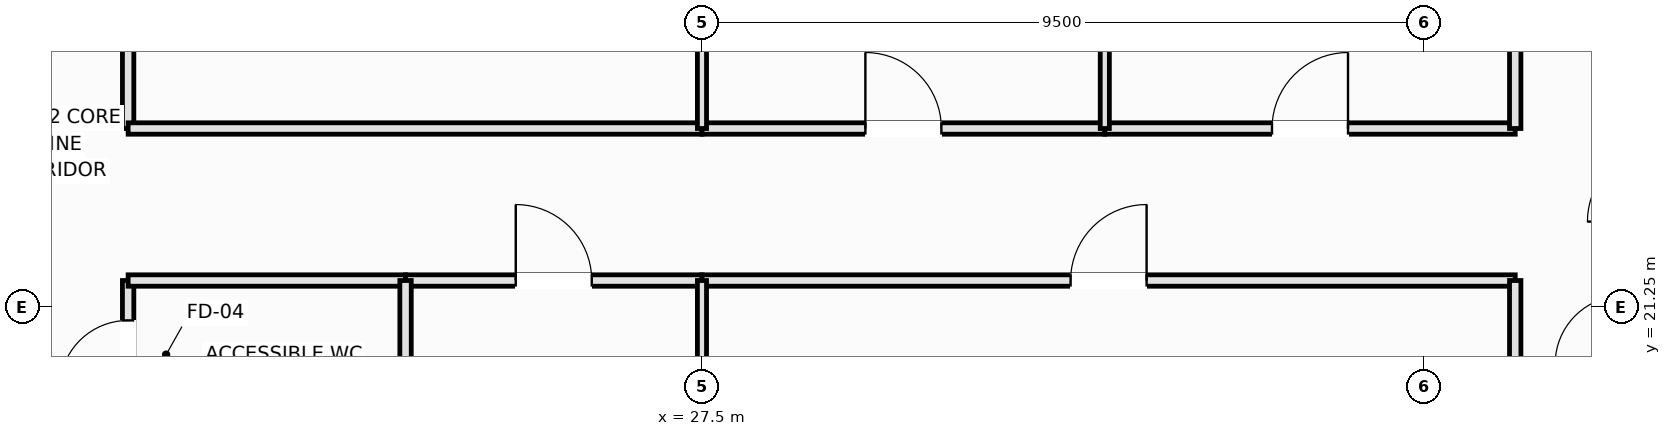
"""IFC4 building model, lengths in metres.
Left out: names, types, materials, properties, quantities, classifications, styles, units other than length and angle.
Written with IfcOpenShell. Run it as: python <this file> out.ifc"""

import sys

from ifc_helpers import new_model, si_unit, direction, frame, frame_2d, origin, place, context, subcontext, project, spatial, rectangle, extrude, element, fill, save


model = new_model("IFC4")
c1 = context("Model", 3, precision=1e-05, world=origin(), true_north=direction((0.0, 1.0)))
c2 = subcontext(c1, "Body", "Model", "MODEL_VIEW")
j1 = project(units=[si_unit("LENGTHUNIT", "METRE"), si_unit("PLANEANGLEUNIT", "RADIAN")], contexts=[c1])
p1 = place(None, origin())
s1 = spatial("IfcSite", under=j1, at=p1, CompositionType="ELEMENT")
p2 = place(p1, origin())
s2 = spatial("IfcBuilding", under=s1, at=p2, CompositionType="ELEMENT")
p3 = place(p2, frame((0.0, 0.0, 166.15)))
s3 = spatial("IfcBuildingStorey", under=s2, at=p3, CompositionType="ELEMENT", Elevation=166.15)
p4 = place(p3, frame((19.95, 19.65, 0.0), z_axis=(0.0, 0.0, 1.0), x_axis=(0.0, 1.0, 0.0)))
e1 = element("IfcWall", 1, at=p4, inside=s3, PredefinedType="PLUMBINGWALL", context=c2, shape_type="SweptSolid", body=[
    extrude(rectangle(XDim=1.95, YDim=0.15, at=frame_2d((0.975, 0.0))), origin(), (0.0, 0.0, 1.0), 3.37),
])
p5 = place(p4, frame((0.525, 0.0, 0.0)))
e2 = element("IfcOpeningElement", 2, at=p5, cuts=e1, PredefinedType="OPENING", context=c2, shape_type="SweptSolid", body=[
    extrude(rectangle(XDim=0.9, YDim=2.1, at=frame_2d((0.45, 1.05))), frame((0.0, 0.085, 0.0), z_axis=(0.0, -1.0, 0.0), x_axis=(1.0, 0.0, 0.0)), (0.0, 0.0, 1.0), 0.17),
])
p6 = place(p3, frame((19.95, 23.6, 0.0), z_axis=(0.0, 0.0, 1.0), x_axis=(0.0, 1.0, 0.0)))
e3 = element("IfcWall", 3, at=p6, inside=s3, PredefinedType="PARTITIONING", context=c2, shape_type="SweptSolid", body=[
    extrude(rectangle(XDim=5.2, YDim=0.15, at=frame_2d((2.6, 0.0))), origin(), (0.0, 0.0, 1.0), 3.37),
])
p7 = place(p6, frame((2.1, 0.0, 0.0)))
e4 = element("IfcOpeningElement", 4, at=p7, cuts=e3, PredefinedType="OPENING", context=c2, shape_type="SweptSolid", body=[
    extrude(rectangle(XDim=1.0, YDim=2.15, at=frame_2d((0.5, 1.075))), frame((0.0, 0.085, 0.0), z_axis=(0.0, -1.0, 0.0), x_axis=(1.0, 0.0, 0.0)), (0.0, 0.0, 1.0), 0.17),
])
p8 = place(p3, frame((19.95, 21.6, 0.0), z_axis=(0.0, 0.0, 1.0), x_axis=(1.0, 0.0, 0.0)))
e5 = element("IfcWall", 5, at=p8, inside=s3, PredefinedType="PLUMBINGWALL", context=c2, shape_type="SweptSolid", body=[
    extrude(rectangle(XDim=3.65, YDim=0.15, at=frame_2d((1.825, 0.0))), origin(), (0.0, 0.0, 1.0), 3.37),
])
p9 = place(p3, frame((23.6, 21.6, 0.0), z_axis=(0.0, 0.0, 1.0), x_axis=(1.0, 0.0, 0.0)))
e6 = element("IfcWall", 6, at=p9, inside=s3, PredefinedType="PARTITIONING", context=c2, shape_type="SweptSolid", body=[
    extrude(rectangle(XDim=3.9, YDim=0.15, at=frame_2d((1.95, 0.0))), origin(), (0.0, 0.0, 1.0), 3.37),
])
p10 = place(p9, frame((1.45, 0.0, 0.0)))
e7 = element("IfcOpeningElement", 7, at=p10, cuts=e6, PredefinedType="OPENING", context=c2, shape_type="SweptSolid", body=[
    extrude(rectangle(XDim=1.0, YDim=2.15, at=frame_2d((0.5, 1.075))), frame((0.0, 0.085, 0.0), z_axis=(0.0, -1.0, 0.0), x_axis=(1.0, 0.0, 0.0)), (0.0, 0.0, 1.0), 0.17),
])
p11 = place(p3, frame((19.95, 23.6, 0.0), z_axis=(0.0, 0.0, 1.0), x_axis=(1.0, 0.0, 0.0)))
e8 = element("IfcWall", 8, at=p11, inside=s3, PredefinedType="PARTITIONING", context=c2, shape_type="SweptSolid", body=[
    extrude(rectangle(XDim=7.55, YDim=0.15, at=frame_2d((3.775, 0.0))), origin(), (0.0, 0.0, 1.0), 3.37),
])
p12 = place(p3, frame((27.5, 21.6, 0.0), z_axis=(0.0, 0.0, 1.0), x_axis=(1.0, 0.0, 0.0)))
e9 = element("IfcWall", 9, at=p12, inside=s3, PredefinedType="PARTITIONING", context=c2, shape_type="SweptSolid", body=[
    extrude(rectangle(XDim=10.7, YDim=0.15, at=frame_2d((5.35, 0.0))), origin(), (0.0, 0.0, 1.0), 3.37),
])
p13 = place(p12, frame((4.85, 0.0, 0.0)))
e10 = element("IfcOpeningElement", 10, at=p13, cuts=e9, PredefinedType="OPENING", context=c2, shape_type="SweptSolid", body=[
    extrude(rectangle(XDim=1.0, YDim=2.15, at=frame_2d((0.5, 1.075))), frame((0.0, 0.085, 0.0), z_axis=(0.0, -1.0, 0.0), x_axis=(1.0, 0.0, 0.0)), (0.0, 0.0, 1.0), 0.17),
])
p14 = place(p3, frame((27.5, 23.6, 0.0), z_axis=(0.0, 0.0, 1.0), x_axis=(1.0, 0.0, 0.0)))
e11 = element("IfcWall", 11, at=p14, inside=s3, PredefinedType="PARTITIONING", context=c2, shape_type="SweptSolid", body=[
    extrude(rectangle(XDim=5.3, YDim=0.15, at=frame_2d((2.65, 0.0))), origin(), (0.0, 0.0, 1.0), 3.37),
])
p15 = place(p14, frame((2.15, 0.0, 0.0)))
e12 = element("IfcOpeningElement", 12, at=p15, cuts=e11, PredefinedType="OPENING", context=c2, shape_type="SweptSolid", body=[
    extrude(rectangle(XDim=1.0, YDim=2.15, at=frame_2d((0.5, 1.075))), frame((0.0, 0.085, 0.0), z_axis=(0.0, -1.0, 0.0), x_axis=(1.0, 0.0, 0.0)), (0.0, 0.0, 1.0), 0.17),
])
p16 = place(p3, frame((32.8, 23.6, 0.0), z_axis=(0.0, 0.0, 1.0), x_axis=(1.0, 0.0, 0.0)))
e13 = element("IfcWall", 13, at=p16, inside=s3, PredefinedType="PARTITIONING", context=c2, shape_type="SweptSolid", body=[
    extrude(rectangle(XDim=5.4, YDim=0.15, at=frame_2d((2.7, 0.0))), origin(), (0.0, 0.0, 1.0), 3.37),
])
p17 = place(p16, frame((2.2, 0.0, 0.0)))
e14 = element("IfcOpeningElement", 14, at=p17, cuts=e13, PredefinedType="OPENING", context=c2, shape_type="SweptSolid", body=[
    extrude(rectangle(XDim=1.0, YDim=2.15, at=frame_2d((0.5, 1.075))), frame((0.0, 0.085, 0.0), z_axis=(0.0, -1.0, 0.0), x_axis=(1.0, 0.0, 0.0)), (0.0, 0.0, 1.0), 0.17),
])
p18 = place(p3, frame((23.6, 19.65, 0.0), z_axis=(0.0, 0.0, 1.0), x_axis=(0.0, 1.0, 0.0)))
e15 = element("IfcWall", 15, at=p18, inside=s3, PredefinedType="PLUMBINGWALL", context=c2, shape_type="SweptSolid", body=[
    extrude(rectangle(XDim=1.95, YDim=0.15, at=frame_2d((0.975, 0.0))), origin(), (0.0, 0.0, 1.0), 3.37),
])
p19 = place(p3, frame((27.5, 18.73, 0.0), z_axis=(0.0, 0.0, 1.0), x_axis=(0.0, 1.0, 0.0)))
e16 = element("IfcWall", 16, at=p19, inside=s3, PredefinedType="PARTITIONING", context=c2, shape_type="SweptSolid", body=[
    extrude(rectangle(XDim=2.87, YDim=0.12, at=frame_2d((1.435, 0.0))), origin(), (0.0, 0.0, 1.0), 3.37),
])
p20 = place(p3, frame((27.5, 23.6, 0.0), z_axis=(0.0, 0.0, 1.0), x_axis=(0.0, 1.0, 0.0)))
e17 = element("IfcWall", 17, at=p20, inside=s3, PredefinedType="PARTITIONING", context=c2, shape_type="SweptSolid", body=[
    extrude(rectangle(XDim=5.2, YDim=0.12, at=frame_2d((2.6, 0.0))), origin(), (0.0, 0.0, 1.0), 3.37),
])
p21 = place(p3, frame((38.2, 20.5, 0.0), z_axis=(0.0, 0.0, 1.0), x_axis=(0.0, 1.0, 0.0)))
e18 = element("IfcWall", 18, at=p21, inside=s3, PredefinedType="PARTITIONING", context=c2, shape_type="SweptSolid", body=[
    extrude(rectangle(XDim=1.1, YDim=0.15, at=frame_2d((0.55, 0.0))), origin(), (0.0, 0.0, 1.0), 2.87),
])
p22 = place(p3, frame((32.8, 23.6, 0.0), z_axis=(0.0, 0.0, 1.0), x_axis=(0.0, 1.0, 0.0)))
e19 = element("IfcWall", 19, at=p22, inside=s3, PredefinedType="PARTITIONING", context=c2, shape_type="SweptSolid", body=[
    extrude(rectangle(XDim=22.89, YDim=0.12, at=frame_2d((11.445, 0.0))), origin(), (0.0, 0.0, 1.0), 3.37),
])
p23 = place(p3, frame((38.2, 23.6, 0.0), z_axis=(0.0, 0.0, 1.0), x_axis=(0.0, 1.0, 0.0)))
e20 = element("IfcWall", 20, at=p23, inside=s3, PredefinedType="PARTITIONING", context=c2, shape_type="SweptSolid", body=[
    extrude(rectangle(XDim=6.2, YDim=0.15, at=frame_2d((3.1, 0.0))), origin(), (0.0, 0.0, 1.0), 2.87),
])
p24 = place(p5, origin())
e21 = element("IfcDoor", 21, at=p24, inside=s3, OperationType="SINGLE_SWING_LEFT", PredefinedType="DOOR", context=c2, shape_type="SweptSolid", body=[
    extrude(rectangle(XDim=0.9, YDim=2.1, at=frame_2d((0.45, 1.05))), frame((0.0, 0.025, 0.0), z_axis=(0.0, -1.0, 0.0), x_axis=(1.0, 0.0, 0.0)), (0.0, 0.0, 1.0), 0.05),
])
fill(e2, e21)
p25 = place(p10, origin())
e22 = element("IfcDoor", 22, at=p25, inside=s3, OperationType="SINGLE_SWING_LEFT", PredefinedType="DOOR", context=c2, shape_type="SweptSolid", body=[
    extrude(rectangle(XDim=1.0, YDim=2.15, at=frame_2d((0.5, 1.075))), frame((0.0, 0.025, 0.0), z_axis=(0.0, -1.0, 0.0), x_axis=(1.0, 0.0, 0.0)), (0.0, 0.0, 1.0), 0.05),
])
fill(e7, e22)
p26 = place(p13, origin())
e23 = element("IfcDoor", 23, at=p26, inside=s3, OperationType="SINGLE_SWING_RIGHT", PredefinedType="DOOR", context=c2, shape_type="SweptSolid", body=[
    extrude(rectangle(XDim=1.0, YDim=2.15, at=frame_2d((0.5, 1.075))), frame((0.0, 0.025, 0.0), z_axis=(0.0, -1.0, 0.0), x_axis=(1.0, 0.0, 0.0)), (0.0, 0.0, 1.0), 0.05),
])
fill(e10, e23)
p27 = place(p15, origin())
e24 = element("IfcDoor", 24, at=p27, inside=s3, OperationType="SINGLE_SWING_LEFT", PredefinedType="DOOR", context=c2, shape_type="SweptSolid", body=[
    extrude(rectangle(XDim=1.0, YDim=2.15, at=frame_2d((0.5, 1.075))), frame((0.0, 0.025, 0.0), z_axis=(0.0, -1.0, 0.0), x_axis=(1.0, 0.0, 0.0)), (0.0, 0.0, 1.0), 0.05),
])
fill(e12, e24)
p28 = place(p17, origin())
e25 = element("IfcDoor", 25, at=p28, inside=s3, OperationType="SINGLE_SWING_RIGHT", PredefinedType="DOOR", context=c2, shape_type="SweptSolid", body=[
    extrude(rectangle(XDim=1.0, YDim=2.15, at=frame_2d((0.5, 1.075))), frame((0.0, 0.025, 0.0), z_axis=(0.0, -1.0, 0.0), x_axis=(1.0, 0.0, 0.0)), (0.0, 0.0, 1.0), 0.05),
])
fill(e14, e25)
save(model, sys.argv[1])
